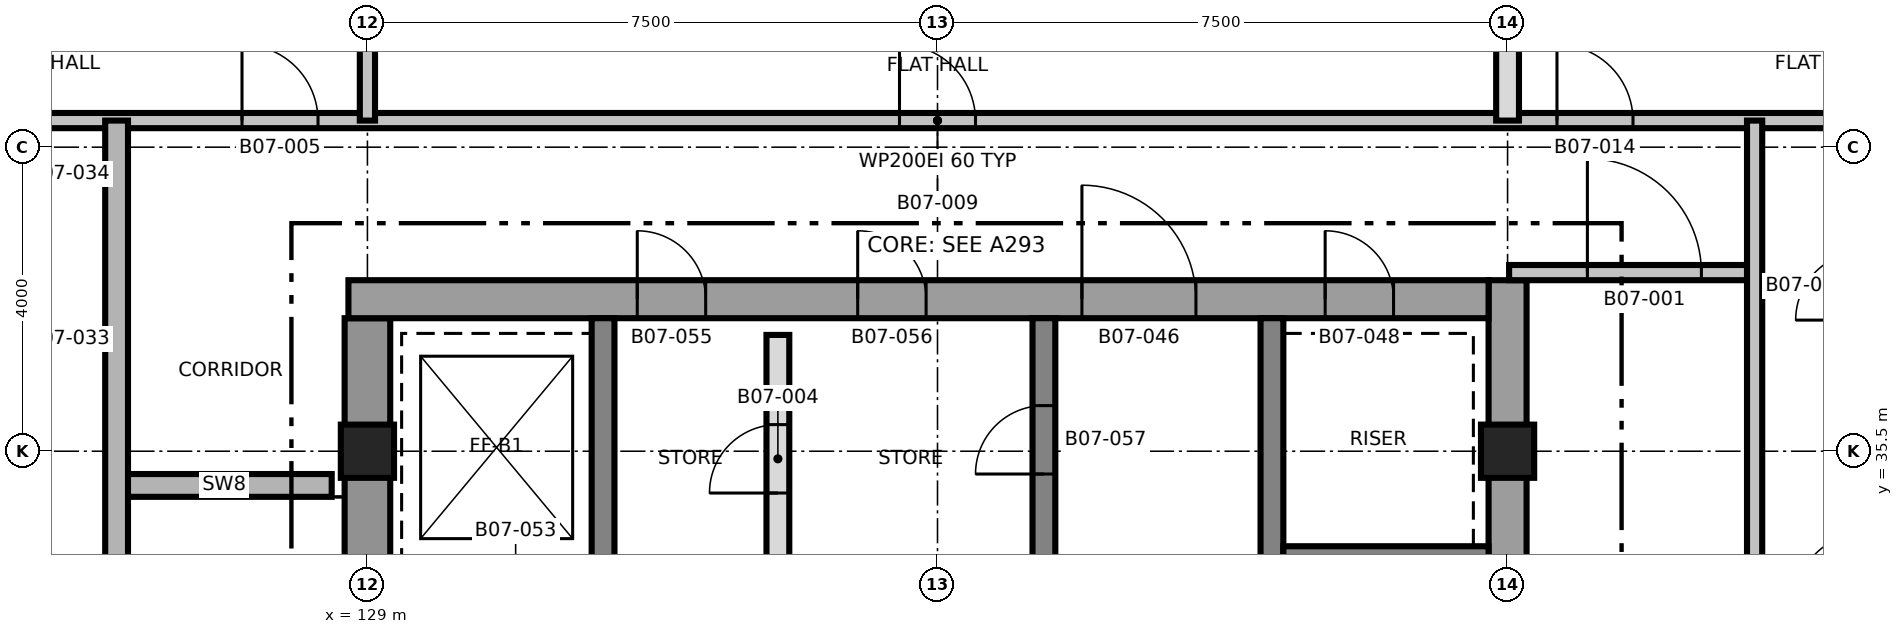
"""IFC4 building model, lengths in metres.
Left out: names, types, materials, properties, quantities, classifications, styles, units other than length and angle.
Written with IfcOpenShell. Run it as: python <this file> out.ifc"""

import sys

from ifc_helpers import new_model, si_unit, direction, frame, frame_2d, origin, origin_2d, place, context, subcontext, project, spatial, rectangle, extrude, element, fill, save


model = new_model("IFC4")
c1 = context("Model", 3, precision=1e-05, world=origin(), true_north=direction((0.0, 1.0)))
c2 = subcontext(c1, "Body", "Model", "MODEL_VIEW")
j1 = project(units=[si_unit("LENGTHUNIT", "METRE"), si_unit("PLANEANGLEUNIT", "RADIAN")], contexts=[c1])
p1 = place(None, origin())
s1 = spatial("IfcSite", under=j1, at=p1, CompositionType="ELEMENT")
p2 = place(p1, origin())
s2 = spatial("IfcBuilding", under=s1, at=p2, CompositionType="ELEMENT")
p3 = place(p2, frame((0.0, 0.0, 87.1)))
s3 = spatial("IfcBuildingStorey", under=s2, at=p3, CompositionType="ELEMENT", Elevation=87.1)
p4 = place(p3, frame((129.0, 24.75, 0.0), z_axis=(0.0, 0.0, 1.0), x_axis=(0.0, 1.0, 0.0)))
e1 = element("IfcWall", 1, at=p4, inside=s3, PredefinedType="SHEAR", context=c2, shape_type="SweptSolid", body=[
    extrude(rectangle(XDim=12.5, YDim=0.6, at=frame_2d((6.25, 0.0))), origin(), (0.0, 0.0, 1.0), 3.7),
])
p5 = place(p4, frame((5.15, 0.0, 0.0)))
e2 = element("IfcOpeningElement", 2, at=p5, cuts=e1, PredefinedType="OPENING", context=c2, shape_type="SweptSolid", body=[
    extrude(rectangle(XDim=1.0, YDim=2.1, at=frame_2d((0.5, 1.05))), frame((0.0, 0.31, 0.0), z_axis=(0.0, -1.0, 0.0), x_axis=(1.0, 0.0, 0.0)), (0.0, 0.0, 1.0), 0.62),
])
p6 = place(p3, frame((144.0, 24.25, 0.0), z_axis=(0.0, 0.0, 1.0), x_axis=(0.0, 1.0, 0.0)))
e3 = element("IfcWall", 3, at=p6, inside=s3, PredefinedType="SHEAR", context=c2, shape_type="SweptSolid", body=[
    extrude(rectangle(XDim=13.5, YDim=0.5, at=frame_2d((6.75, 0.0))), origin(), (0.0, 0.0, 1.0), 3.7),
])
p7 = place(p3, frame((128.75, 37.5, 0.0), z_axis=(0.0, 0.0, 1.0), x_axis=(1.0, 0.0, 0.0)))
e4 = element("IfcWall", 4, at=p7, inside=s3, PredefinedType="SHEAR", context=c2, shape_type="SweptSolid", body=[
    extrude(rectangle(XDim=15.0, YDim=0.5, at=frame_2d((7.5, 0.0))), origin(), (0.0, 0.0, 1.0), 3.7),
])
p8 = place(p7, frame((9.65, 0.0, 0.0)))
e5 = element("IfcOpeningElement", 5, at=p8, cuts=e4, PredefinedType="OPENING", context=c2, shape_type="SweptSolid", body=[
    extrude(rectangle(XDim=1.5, YDim=2.1, at=frame_2d((0.75, 1.05))), frame((0.0, 0.26, 0.0), z_axis=(0.0, -1.0, 0.0), x_axis=(1.0, 0.0, 0.0)), (0.0, 0.0, 1.0), 0.52),
])
p9 = place(p7, frame((12.85, 0.0, 0.0)))
e6 = element("IfcOpeningElement", 6, at=p9, cuts=e4, PredefinedType="OPENING", context=c2, shape_type="SweptSolid", body=[
    extrude(rectangle(XDim=0.9, YDim=2.1, at=frame_2d((0.45, 1.05))), frame((0.0, 0.26, 0.0), z_axis=(0.0, -1.0, 0.0), x_axis=(1.0, 0.0, 0.0)), (0.0, 0.0, 1.0), 0.52),
])
p10 = place(p7, frame((3.8, 0.0, 0.0)))
e7 = element("IfcOpeningElement", 7, at=p10, cuts=e4, PredefinedType="OPENING", context=c2, shape_type="SweptSolid", body=[
    extrude(rectangle(XDim=0.9, YDim=2.1, at=frame_2d((0.45, 1.05))), frame((0.0, 0.26, 0.0), z_axis=(0.0, -1.0, 0.0), x_axis=(1.0, 0.0, 0.0)), (0.0, 0.0, 1.0), 0.52),
])
p11 = place(p7, frame((6.7, 0.0, 0.0)))
e8 = element("IfcOpeningElement", 8, at=p11, cuts=e4, PredefinedType="OPENING", context=c2, shape_type="SweptSolid", body=[
    extrude(rectangle(XDim=0.9, YDim=2.1, at=frame_2d((0.45, 1.05))), frame((0.0, 0.26, 0.0), z_axis=(0.0, -1.0, 0.0), x_axis=(1.0, 0.0, 0.0)), (0.0, 0.0, 1.0), 0.52),
])
p12 = place(p3, frame((132.1, 24.75, 0.0), z_axis=(0.0, 0.0, 1.0), x_axis=(0.0, 1.0, 0.0)))
e9 = element("IfcWall", 9, at=p12, inside=s3, PredefinedType="SHEAR", context=c2, shape_type="SweptSolid", body=[
    extrude(rectangle(XDim=12.5, YDim=0.3, at=frame_2d((6.25, 0.0))), origin(), (0.0, 0.0, 1.0), 3.7),
])
p13 = place(p12, frame((3.9, 0.0, 0.0)))
e10 = element("IfcOpeningElement", 10, at=p13, cuts=e9, PredefinedType="OPENING", context=c2, shape_type="SweptSolid", body=[
    extrude(rectangle(XDim=1.2, YDim=2.1, at=frame_2d((0.6, 1.05))), frame((0.0, 0.16, 0.0), z_axis=(0.0, -1.0, 0.0), x_axis=(1.0, 0.0, 0.0)), (0.0, 0.0, 1.0), 0.32),
])
p14 = place(p3, frame((137.9, 24.75, 0.0), z_axis=(0.0, 0.0, 1.0), x_axis=(0.0, 1.0, 0.0)))
e11 = element("IfcWall", 11, at=p14, inside=s3, PredefinedType="SHEAR", context=c2, shape_type="SweptSolid", body=[
    extrude(rectangle(XDim=12.5, YDim=0.3, at=frame_2d((6.25, 0.0))), origin(), (0.0, 0.0, 1.0), 3.7),
])
p15 = place(p14, frame((3.95, 0.0, 0.0)))
e12 = element("IfcOpeningElement", 12, at=p15, cuts=e11, PredefinedType="OPENING", context=c2, shape_type="SweptSolid", body=[
    extrude(rectangle(XDim=1.5, YDim=2.1, at=frame_2d((0.75, 1.05))), frame((0.0, 0.16, 0.0), z_axis=(0.0, -1.0, 0.0), x_axis=(1.0, 0.0, 0.0)), (0.0, 0.0, 1.0), 0.32),
])
p16 = place(p14, frame((10.45, 0.0, 0.0)))
e13 = element("IfcOpeningElement", 13, at=p16, cuts=e11, PredefinedType="OPENING", context=c2, shape_type="SweptSolid", body=[
    extrude(rectangle(XDim=0.9, YDim=2.1, at=frame_2d((0.45, 1.05))), frame((0.0, 0.16, 0.0), z_axis=(0.0, -1.0, 0.0), x_axis=(1.0, 0.0, 0.0)), (0.0, 0.0, 1.0), 0.32),
])
p17 = place(p3, frame((140.9, 24.75, 0.0), z_axis=(0.0, 0.0, 1.0), x_axis=(0.0, 1.0, 0.0)))
e14 = element("IfcWall", 14, at=p17, inside=s3, PredefinedType="SHEAR", context=c2, shape_type="SweptSolid", body=[
    extrude(rectangle(XDim=12.5, YDim=0.3, at=frame_2d((6.25, 0.0))), origin(), (0.0, 0.0, 1.0), 3.7),
])
p18 = place(p17, frame((5.9, 0.0, 0.0)))
e15 = element("IfcOpeningElement", 15, at=p18, cuts=e14, PredefinedType="OPENING", context=c2, shape_type="SweptSolid", body=[
    extrude(rectangle(XDim=1.2, YDim=2.1, at=frame_2d((0.6, 1.05))), frame((0.0, 0.16, 0.0), z_axis=(0.0, -1.0, 0.0), x_axis=(1.0, 0.0, 0.0)), (0.0, 0.0, 1.0), 0.32),
])
p19 = place(p3, frame((141.05, 34.1, 0.0), z_axis=(0.0, 0.0, 1.0), x_axis=(1.0, 0.0, 0.0)))
e16 = element("IfcWall", 16, at=p19, inside=s3, PredefinedType="SHEAR", context=c2, shape_type="SweptSolid", body=[
    extrude(rectangle(XDim=2.7, YDim=0.3, at=frame_2d((1.35, 0.0))), origin(), (0.0, 0.0, 1.0), 3.7),
])
for number, where, z_axis, x_axis in (
    (17, (129.0, 35.5, 0.0), (0.0, 0.0, 1.0), (1.0, 0.0, 0.0)),
    (18, (144.0, 35.5, 0.0), (0.0, 0.0, 1.0), (1.0, 0.0, 0.0)),
):
    element("IfcColumn", number, at=place(p3, frame(where, z_axis=z_axis, x_axis=x_axis)), inside=s3, PredefinedType="COLUMN", context=c2, shape_type="SweptSolid", body=[
        extrude(rectangle(XDim=0.7, YDim=0.7, at=origin_2d()), origin(), (0.0, 0.0, 1.0), 3.7),
    ])
p20 = place(p3, frame((125.7, 35.05, 0.0), z_axis=(0.0, 0.0, 1.0), x_axis=(1.0, 0.0, 0.0)))
e19 = element("IfcWall", 19, at=p20, inside=s3, PredefinedType="SHEAR", context=c2, shape_type="SweptSolid", body=[
    extrude(rectangle(XDim=2.83, YDim=0.3, at=frame_2d((1.415, 0.0))), origin(), (0.0, 0.0, 1.0), 3.4),
])
p21 = place(p3, frame((144.02, 37.85, 0.0), z_axis=(0.0, 0.0, 1.0), x_axis=(1.0, 0.0, 0.0)))
e20 = element("IfcWall", 20, at=p21, inside=s3, PredefinedType="PARTITIONING", context=c2, shape_type="SweptSolid", body=[
    extrude(rectangle(XDim=3.23, YDim=0.2, at=frame_2d((1.615, 0.0))), origin(), (0.0, 0.0, 1.0), 3.4),
])
p22 = place(p21, frame((1.03, 0.0, 0.0)))
e21 = element("IfcOpeningElement", 21, at=p22, cuts=e20, PredefinedType="OPENING", context=c2, shape_type="SweptSolid", body=[
    extrude(rectangle(XDim=1.5, YDim=2.1, at=frame_2d((0.75, 1.05))), frame((0.0, 0.11, 0.0), z_axis=(0.0, -1.0, 0.0), x_axis=(1.0, 0.0, 0.0)), (0.0, 0.0, 1.0), 0.22),
])
p23 = place(p3, frame((120.56, 39.85, 0.0), z_axis=(0.0, 0.0, 1.0), x_axis=(1.0, 0.0, 0.0)))
e22 = element("IfcWall", 22, at=p23, inside=s3, PredefinedType="PARTITIONING", context=c2, shape_type="SweptSolid", body=[
    extrude(rectangle(XDim=31.88, YDim=0.2, at=frame_2d((15.94, 0.0))), origin(), (0.0, 0.0, 1.0), 3.4),
])
p24 = place(p23, frame((6.79, 0.0, 0.0)))
e23 = element("IfcOpeningElement", 23, at=p24, cuts=e22, PredefinedType="OPENING", context=c2, shape_type="SweptSolid", body=[
    extrude(rectangle(XDim=1.0, YDim=2.1, at=frame_2d((0.5, 1.05))), frame((0.0, 0.11, 0.0), z_axis=(0.0, -1.0, 0.0), x_axis=(1.0, 0.0, 0.0)), (0.0, 0.0, 1.0), 0.22),
])
p25 = place(p23, frame((15.44, 0.0, 0.0)))
e24 = element("IfcOpeningElement", 24, at=p25, cuts=e22, PredefinedType="OPENING", context=c2, shape_type="SweptSolid", body=[
    extrude(rectangle(XDim=1.0, YDim=2.1, at=frame_2d((0.5, 1.05))), frame((0.0, 0.11, 0.0), z_axis=(0.0, -1.0, 0.0), x_axis=(1.0, 0.0, 0.0)), (0.0, 0.0, 1.0), 0.22),
])
p26 = place(p23, frame((24.09, 0.0, 0.0)))
e25 = element("IfcOpeningElement", 25, at=p26, cuts=e22, PredefinedType="OPENING", context=c2, shape_type="SweptSolid", body=[
    extrude(rectangle(XDim=1.0, YDim=2.1, at=frame_2d((0.5, 1.05))), frame((0.0, 0.11, 0.0), z_axis=(0.0, -1.0, 0.0), x_axis=(1.0, 0.0, 0.0)), (0.0, 0.0, 1.0), 0.22),
])
p27 = place(p3, frame((125.7, 22.15, 0.0), z_axis=(0.0, 0.0, 1.0), x_axis=(0.0, 1.0, 0.0)))
e26 = element("IfcWall", 26, at=p27, inside=s3, PredefinedType="SHEAR", context=c2, shape_type="SweptSolid", body=[
    extrude(rectangle(XDim=17.7, YDim=0.3, at=frame_2d((8.85, 0.0))), origin(), (0.0, 0.0, 1.0), 3.4),
])
p28 = place(p27, frame((2.7, 0.0, 0.0)))
e27 = element("IfcOpeningElement", 27, at=p28, cuts=e26, PredefinedType="OPENING", context=c2, shape_type="SweptSolid", body=[
    extrude(rectangle(XDim=1.0, YDim=2.1, at=frame_2d((0.5, 1.05))), frame((0.0, 0.16, 0.0), z_axis=(0.0, -1.0, 0.0), x_axis=(1.0, 0.0, 0.0)), (0.0, 0.0, 1.0), 0.32),
])
p29 = place(p3, frame((129.0, 39.85, 0.0), z_axis=(0.0, 0.0, 1.0), x_axis=(0.0, 1.0, 0.0)))
e28 = element("IfcWall", 28, at=p29, inside=s3, PredefinedType="PARTITIONING", context=c2, shape_type="SweptSolid", body=[
    extrude(rectangle(XDim=5.59, YDim=0.2, at=frame_2d((2.795, 0.0))), origin(), (0.0, 0.0, 1.0), 3.4),
])
p30 = place(p3, frame((134.4, 33.77, 0.0), z_axis=(0.0, 0.0, 1.0), x_axis=(0.0, 1.0, 0.0)))
e29 = element("IfcWall", 29, at=p30, inside=s3, PredefinedType="PARTITIONING", context=c2, shape_type="SweptSolid", body=[
    extrude(rectangle(XDim=3.26, YDim=0.3, at=frame_2d((1.63, 0.0))), origin(), (0.0, 0.0, 1.0), 3.4),
])
p31 = place(p30, frame((1.18, 0.0, 0.0)))
e30 = element("IfcOpeningElement", 30, at=p31, cuts=e29, PredefinedType="OPENING", context=c2, shape_type="SweptSolid", body=[
    extrude(rectangle(XDim=0.9, YDim=2.1, at=frame_2d((0.45, 1.05))), frame((0.0, 0.16, 0.0), z_axis=(0.0, -1.0, 0.0), x_axis=(1.0, 0.0, 0.0)), (0.0, 0.0, 1.0), 0.32),
])
p32 = place(p3, frame((144.0, 39.85, 0.0), z_axis=(0.0, 0.0, 1.0), x_axis=(0.0, 1.0, 0.0)))
e31 = element("IfcWall", 31, at=p32, inside=s3, PredefinedType="PARTITIONING", context=c2, shape_type="SweptSolid", body=[
    extrude(rectangle(XDim=2.987, YDim=0.3, at=frame_2d((1.493, 0.0))), origin(), (0.0, 0.0, 1.0), 3.4),
])
p33 = place(p3, frame((147.25, 22.15, 0.0), z_axis=(0.0, 0.0, 1.0), x_axis=(0.0, 1.0, 0.0)))
e32 = element("IfcWall", 32, at=p33, inside=s3, PredefinedType="PARTITIONING", context=c2, shape_type="SweptSolid", body=[
    extrude(rectangle(XDim=17.7, YDim=0.2, at=frame_2d((8.85, 0.0))), origin(), (0.0, 0.0, 1.0), 3.4),
])
p34 = place(p33, frame((2.65, 0.0, 0.0)))
e33 = element("IfcOpeningElement", 33, at=p34, cuts=e32, PredefinedType="OPENING", context=c2, shape_type="SweptSolid", body=[
    extrude(rectangle(XDim=1.0, YDim=2.1, at=frame_2d((0.5, 1.05))), frame((0.0, 0.11, 0.0), z_axis=(0.0, -1.0, 0.0), x_axis=(1.0, 0.0, 0.0)), (0.0, 0.0, 1.0), 0.22),
])
p35 = place(p22, origin())
e34 = element("IfcDoor", 34, at=p35, inside=s3, OperationType="SINGLE_SWING_LEFT", PredefinedType="DOOR", context=c2, shape_type="SweptSolid", body=[
    extrude(rectangle(XDim=1.5, YDim=2.1, at=frame_2d((0.75, 1.05))), frame((0.0, 0.025, 0.0), z_axis=(0.0, -1.0, 0.0), x_axis=(1.0, 0.0, 0.0)), (0.0, 0.0, 1.0), 0.05),
])
fill(e21, e34)
p36 = place(p31, origin())
e35 = element("IfcDoor", 35, at=p36, inside=s3, OperationType="SINGLE_SWING_RIGHT", PredefinedType="DOOR", context=c2, shape_type="SweptSolid", body=[
    extrude(rectangle(XDim=0.9, YDim=2.1, at=frame_2d((0.45, 1.05))), frame((0.0, 0.025, 0.0), z_axis=(0.0, -1.0, 0.0), x_axis=(1.0, 0.0, 0.0)), (0.0, 0.0, 1.0), 0.05),
])
fill(e30, e35)
p37 = place(p24, origin())
e36 = element("IfcDoor", 36, at=p37, inside=s3, OperationType="SINGLE_SWING_LEFT", PredefinedType="DOOR", context=c2, shape_type="SweptSolid", body=[
    extrude(rectangle(XDim=1.0, YDim=2.1, at=frame_2d((0.5, 1.05))), frame((0.0, 0.025, 0.0), z_axis=(0.0, -1.0, 0.0), x_axis=(1.0, 0.0, 0.0)), (0.0, 0.0, 1.0), 0.05),
])
fill(e23, e36)
p38 = place(p25, origin())
e37 = element("IfcDoor", 37, at=p38, inside=s3, OperationType="SINGLE_SWING_LEFT", PredefinedType="DOOR", context=c2, shape_type="SweptSolid", body=[
    extrude(rectangle(XDim=1.0, YDim=2.1, at=frame_2d((0.5, 1.05))), frame((0.0, 0.025, 0.0), z_axis=(0.0, -1.0, 0.0), x_axis=(1.0, 0.0, 0.0)), (0.0, 0.0, 1.0), 0.05),
])
fill(e24, e37)
p39 = place(p26, origin())
e38 = element("IfcDoor", 38, at=p39, inside=s3, OperationType="SINGLE_SWING_RIGHT", PredefinedType="DOOR", context=c2, shape_type="SweptSolid", body=[
    extrude(rectangle(XDim=1.0, YDim=2.1, at=frame_2d((0.5, 1.05))), frame((0.0, 0.025, 0.0), z_axis=(0.0, -1.0, 0.0), x_axis=(1.0, 0.0, 0.0)), (0.0, 0.0, 1.0), 0.05),
])
fill(e25, e38)
p40 = place(p8, origin())
e39 = element("IfcDoor", 39, at=p40, inside=s3, OperationType="SINGLE_SWING_RIGHT", PredefinedType="DOOR", context=c2, shape_type="SweptSolid", body=[
    extrude(rectangle(XDim=1.5, YDim=2.1, at=frame_2d((0.75, 1.05))), frame((0.0, 0.025, 0.0), z_axis=(0.0, -1.0, 0.0), x_axis=(1.0, 0.0, 0.0)), (0.0, 0.0, 1.0), 0.05),
])
fill(e5, e39)
p41 = place(p9, origin())
e40 = element("IfcDoor", 40, at=p41, inside=s3, OperationType="SINGLE_SWING_RIGHT", PredefinedType="DOOR", context=c2, shape_type="SweptSolid", body=[
    extrude(rectangle(XDim=0.9, YDim=2.1, at=frame_2d((0.45, 1.05))), frame((0.0, 0.025, 0.0), z_axis=(0.0, -1.0, 0.0), x_axis=(1.0, 0.0, 0.0)), (0.0, 0.0, 1.0), 0.05),
])
fill(e6, e40)
p42 = place(p10, origin())
e41 = element("IfcDoor", 41, at=p42, inside=s3, OperationType="SINGLE_SWING_LEFT", PredefinedType="DOOR", context=c2, shape_type="SweptSolid", body=[
    extrude(rectangle(XDim=0.9, YDim=2.1, at=frame_2d((0.45, 1.05))), frame((0.0, 0.025, 0.0), z_axis=(0.0, -1.0, 0.0), x_axis=(1.0, 0.0, 0.0)), (0.0, 0.0, 1.0), 0.05),
])
fill(e7, e41)
p43 = place(p11, origin())
e42 = element("IfcDoor", 42, at=p43, inside=s3, OperationType="SINGLE_SWING_RIGHT", PredefinedType="DOOR", context=c2, shape_type="SweptSolid", body=[
    extrude(rectangle(XDim=0.9, YDim=2.1, at=frame_2d((0.45, 1.05))), frame((0.0, 0.025, 0.0), z_axis=(0.0, -1.0, 0.0), x_axis=(1.0, 0.0, 0.0)), (0.0, 0.0, 1.0), 0.05),
])
fill(e8, e42)
p44 = place(p16, origin())
e43 = element("IfcDoor", 43, at=p44, inside=s3, OperationType="SINGLE_SWING_RIGHT", PredefinedType="DOOR", context=c2, shape_type="SweptSolid", body=[
    extrude(rectangle(XDim=0.9, YDim=2.1, at=frame_2d((0.45, 1.05))), frame((0.0, 0.025, 0.0), z_axis=(0.0, -1.0, 0.0), x_axis=(1.0, 0.0, 0.0)), (0.0, 0.0, 1.0), 0.05),
])
fill(e13, e43)
save(model, sys.argv[1])
